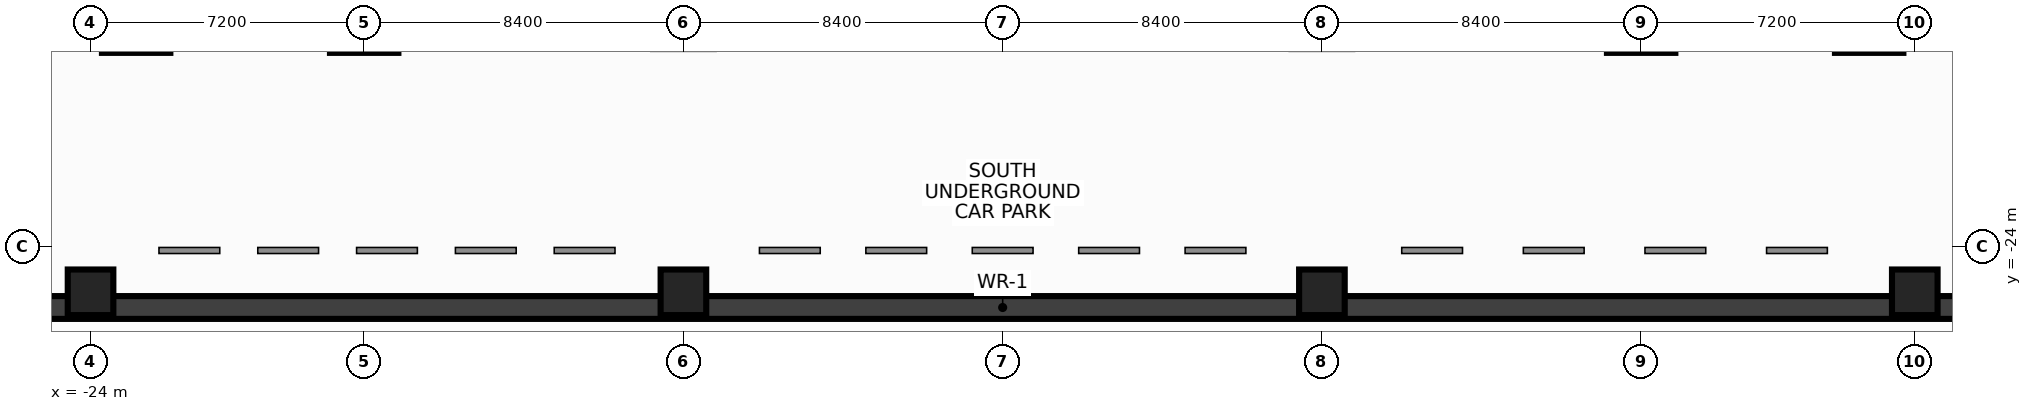
"""IFC4 building model, lengths in metres.
Left out: names, types, materials, properties, quantities, classifications, styles, units other than length and angle.
Written with IfcOpenShell. Run it as: python <this file> out.ifc"""

import sys

from ifc_helpers import new_model, si_unit, direction, frame, frame_2d, origin, origin_2d, place, context, subcontext, project, spatial, rectangle, hollow_rectangle, extrude, source, transform, mapped, element, save


model = new_model("IFC4")
c1 = context("Model", 3, precision=1e-05, world=origin(), true_north=direction((0.0, 1.0)))
c2 = subcontext(c1, "Body", "Model", "MODEL_VIEW")
j1 = project(units=[si_unit("LENGTHUNIT", "METRE"), si_unit("PLANEANGLEUNIT", "RADIAN")], contexts=[c1])
p1 = place(None, origin())
s1 = spatial("IfcSite", under=j1, at=p1, CompositionType="ELEMENT")
p2 = place(p1, origin())
s2 = spatial("IfcBuilding", under=s1, at=p2, CompositionType="ELEMENT")
p3 = place(p2, frame((0.0, 0.0, -11.0)))
s3 = spatial("IfcBuildingStorey", under=s2, at=p3, CompositionType="ELEMENT", Elevation=-11.0)
m1 = source(origin(), c2, "Body", "SweptSolid", [
    extrude(rectangle(XDim=77.8, YDim=0.6, at=frame_2d((38.9, 0.0))), origin(), (0.0, 0.0, 1.0), 5.5),
])
p4 = place(p3, frame((-38.9, -25.6, 0.0), z_axis=(0.0, 0.0, 1.0), x_axis=(1.0, 0.0, 0.0)))
e1 = element("IfcWall", 1, at=p4, inside=s3, PredefinedType="SHEAR", context=c2, shape_type="MappedRepresentation", body=[
    mapped(m1, transform((0.0, 0.0, 0.0), x_axis=(1.0, 0.0, 0.0), y_axis=(0.0, 1.0, 0.0), z_axis=(0.0, 0.0, 1.0), scale=1.0)),
])
m2 = source(origin(), c2, "Body", "SweptSolid", [
    extrude(hollow_rectangle(XDim=1.2, YDim=1.2, WallThickness=0.055, at=origin_2d()), origin(), (0.0, 0.0, 1.0), 5.5),
])
for number, where, z_axis, x_axis in (
    (2, (-24.0, -25.2, 0.0), (0.0, 0.0, 1.0), (1.0, 0.0, 0.0)),
    (3, (-8.4, -25.2, 0.0), (0.0, 0.0, 1.0), (1.0, 0.0, 0.0)),
    (4, (8.4, -25.2, 0.0), (0.0, 0.0, 1.0), (1.0, 0.0, 0.0)),
    (5, (24.0, -25.2, 0.0), (0.0, 0.0, 1.0), (1.0, 0.0, 0.0)),
):
    element("IfcColumn", number, at=place(p3, frame(where, z_axis=z_axis, x_axis=x_axis)), inside=s3, PredefinedType="COLUMN", context=c2, shape_type="MappedRepresentation", body=[
        mapped(m2, transform((0.0, 0.0, 0.0), x_axis=(1.0, 0.0, 0.0), y_axis=(0.0, 1.0, 0.0), z_axis=(0.0, 0.0, 1.0), scale=1.0)),
    ])
m3 = source(origin(), c2, "Body", "SweptSolid", [
    extrude(rectangle(XDim=1.8, YDim=1.8, at=origin_2d()), origin(), (0.0, 0.0, 1.0), 5.5),
])
for number, where, z_axis, x_axis in (
    (6, (-16.8, -18.0, 0.0), (0.0, 0.0, 1.0), (1.0, 0.0, 0.0)),
    (7, (16.8, -18.0, 0.0), (0.0, 0.0, 1.0), (1.0, 0.0, 0.0)),
    (8, (-22.8, -18.0, 0.0), (0.0, 0.0, 1.0), (1.0, 0.0, 0.0)),
    (9, (22.8, -18.0, 0.0), (0.0, 0.0, 1.0), (1.0, 0.0, 0.0)),
):
    element("IfcColumn", number, at=place(p3, frame(where, z_axis=z_axis, x_axis=x_axis)), inside=s3, PredefinedType="COLUMN", context=c2, shape_type="MappedRepresentation", body=[
        mapped(m3, transform((0.0, 0.0, 0.0), x_axis=(1.0, 0.0, 0.0), y_axis=(0.0, 1.0, 0.0), z_axis=(0.0, 0.0, 1.0), scale=1.0)),
    ])
save(model, sys.argv[1])
